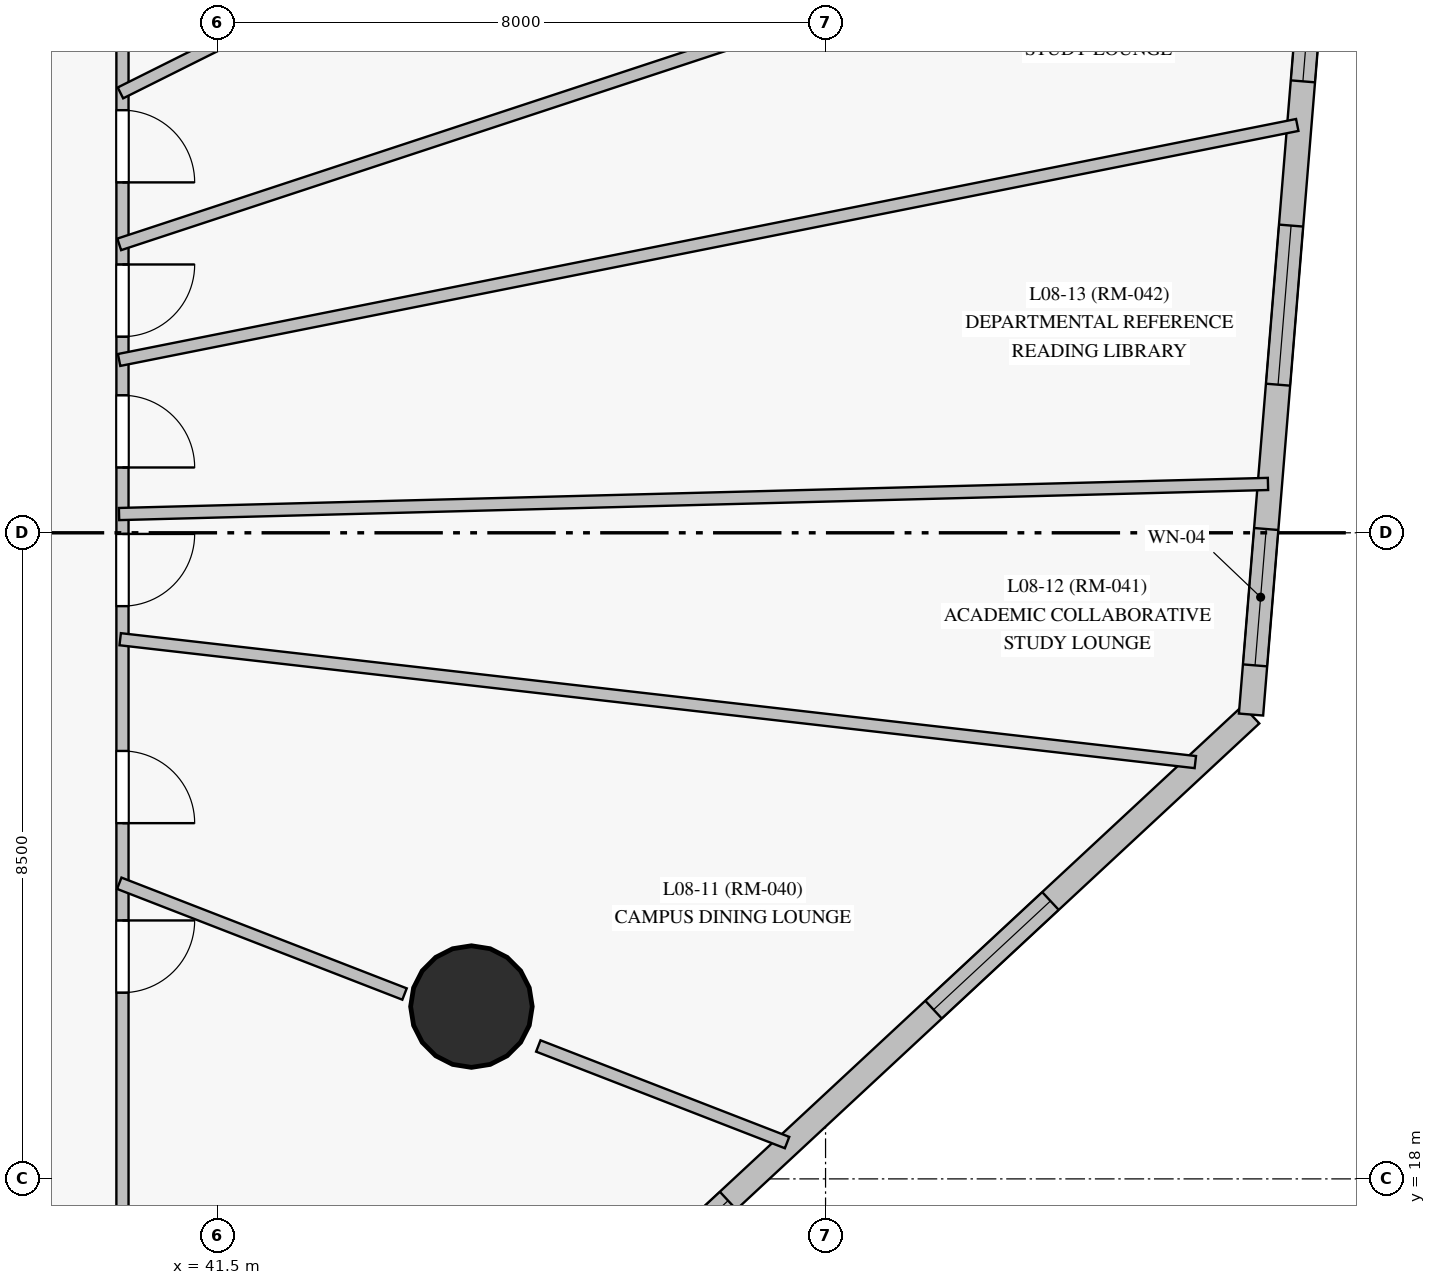
"""IFC4 building model, lengths in metres.
Left out: names, types, materials, properties, quantities, classifications, styles, units other than length and angle.
Written with IfcOpenShell. Run it as: python <this file> out.ifc"""

import sys

from ifc_helpers import new_model, si_unit, direction, frame, frame_2d, origin, origin_with_axes, origin_2d, place, context, subcontext, project, spatial, rectangle, circle, extrude, source, transform, mapped, element, fill, save


model = new_model("IFC4")
c1 = context("Model", 3, precision=1e-05, world=origin(), true_north=direction((0.0, 1.0)))
c2 = subcontext(c1, "Body", "Model", "MODEL_VIEW")
j1 = project(units=[si_unit("LENGTHUNIT", "METRE"), si_unit("PLANEANGLEUNIT", "RADIAN")], contexts=[c1])
p1 = place(None, origin())
s1 = spatial("IfcSite", under=j1, at=p1, CompositionType="ELEMENT")
p2 = place(p1, origin())
s2 = spatial("IfcBuilding", under=s1, at=p2, CompositionType="ELEMENT")
p3 = place(p2, frame((0.0, 0.0, 33.7)))
s3 = spatial("IfcBuildingStorey", under=s2, at=p3, CompositionType="ELEMENT", Elevation=33.7)
m1 = source(origin_with_axes(), c2, "Body", "SweptSolid", [
    extrude(circle(Radius=0.8, at=origin_2d()), origin(), (0.0, 0.0, 1.0), 3.6),
])
p4 = place(p3, frame((44.841, 20.267, 0.0), z_axis=(0.0, 0.0, 1.0), x_axis=(1.0, 0.0, 0.0)))
e1 = element("IfcColumn", 1, at=p4, inside=s3, PredefinedType="COLUMN", context=c2, shape_type="MappedRepresentation", body=[
    mapped(m1, transform((0.0, 0.0, 0.0), scale=1.0)),
])
p5 = place(p3, frame((43.208, 13.057, 0.0), z_axis=(0.0, 0.0, 1.0), x_axis=(0.732423224096, 0.680849631567, 0.0)))
e2 = element("IfcWall", 2, at=p5, inside=s3, PredefinedType="SOLIDWALL", context=c2, shape_type="SweptSolid", body=[
    extrude(rectangle(XDim=16.232, YDim=0.32, at=frame_2d((8.116, 0.0))), origin(), (0.0, 0.0, 1.0), 3.35),
])
p6 = place(p5, frame((1.133, 0.0, 0.85)))
e3 = element("IfcOpeningElement", 3, at=p6, cuts=e2, PredefinedType="OPENING", context=c2, shape_type="SweptSolid", body=[
    extrude(rectangle(XDim=2.1, YDim=1.95, at=frame_2d((1.05, 0.975))), frame((0.0, 0.17, 0.0), z_axis=(0.0, -1.0, 0.0), x_axis=(1.0, 0.0, 0.0)), (0.0, 0.0, 1.0), 0.34),
])
p7 = place(p5, frame((4.74, 0.0, 0.85)))
e4 = element("IfcOpeningElement", 4, at=p7, cuts=e2, PredefinedType="OPENING", context=c2, shape_type="SweptSolid", body=[
    extrude(rectangle(XDim=2.1, YDim=1.95, at=frame_2d((1.05, 0.975))), frame((0.0, 0.17, 0.0), z_axis=(0.0, -1.0, 0.0), x_axis=(1.0, 0.0, 0.0)), (0.0, 0.0, 1.0), 0.34),
])
p8 = place(p5, frame((10.53, 0.0, 0.85)))
e5 = element("IfcOpeningElement", 5, at=p8, cuts=e2, PredefinedType="OPENING", context=c2, shape_type="SweptSolid", body=[
    extrude(rectangle(XDim=2.1, YDim=1.95, at=frame_2d((1.05, 0.975))), frame((0.0, 0.17, 0.0), z_axis=(0.0, -1.0, 0.0), x_axis=(1.0, 0.0, 0.0)), (0.0, 0.0, 1.0), 0.34),
])
p9 = place(p3, frame((55.097, 24.109, 0.0), z_axis=(0.0, 0.0, 1.0), x_axis=(0.081674843911, 0.996659028892, 0.0)))
e6 = element("IfcWall", 6, at=p9, inside=s3, PredefinedType="SOLIDWALL", context=c2, shape_type="SweptSolid", body=[
    extrude(rectangle(XDim=10.806, YDim=0.32, at=frame_2d((5.403, 0.0))), origin(), (0.0, 0.0, 1.0), 3.35),
])
p10 = place(p9, frame((0.649, 0.0, 0.85)))
e7 = element("IfcOpeningElement", 7, at=p10, cuts=e6, PredefinedType="OPENING", context=c2, shape_type="SweptSolid", body=[
    extrude(rectangle(XDim=1.8, YDim=1.85, at=frame_2d((0.9, 0.925))), frame((0.0, 0.17, 0.0), z_axis=(0.0, -1.0, 0.0), x_axis=(1.0, 0.0, 0.0)), (0.0, 0.0, 1.0), 0.34),
])
p11 = place(p9, frame((4.354, 0.0, 0.85)))
e8 = element("IfcOpeningElement", 8, at=p11, cuts=e6, PredefinedType="OPENING", context=c2, shape_type="SweptSolid", body=[
    extrude(rectangle(XDim=2.1, YDim=1.95, at=frame_2d((1.05, 0.975))), frame((0.0, 0.17, 0.0), z_axis=(0.0, -1.0, 0.0), x_axis=(1.0, 0.0, 0.0)), (0.0, 0.0, 1.0), 0.34),
])
p12 = place(p9, frame((8.358, 0.0, 0.85)))
e9 = element("IfcOpeningElement", 9, at=p12, cuts=e6, PredefinedType="OPENING", context=c2, shape_type="SweptSolid", body=[
    extrude(rectangle(XDim=1.8, YDim=1.85, at=frame_2d((0.9, 0.925))), frame((0.0, 0.17, 0.0), z_axis=(0.0, -1.0, 0.0), x_axis=(1.0, 0.0, 0.0)), (0.0, 0.0, 1.0), 0.34),
])
p13 = place(p3, frame((40.25, 37.65, 0.0), z_axis=(0.0, 0.0, 1.0), x_axis=(0.0, -1.0, 0.0)))
e10 = element("IfcWall", 10, at=p13, inside=s3, PredefinedType="PARTITIONING", context=c2, shape_type="SweptSolid", body=[
    extrude(rectangle(XDim=22.3, YDim=0.16, at=frame_2d((11.15, 0.0))), origin(), (0.0, 0.0, 1.0), 2.75),
])
p14 = place(p13, frame((16.25, 0.0, 0.0)))
e11 = element("IfcOpeningElement", 11, at=p14, cuts=e10, PredefinedType="OPENING", context=c2, shape_type="SweptSolid", body=[
    extrude(rectangle(XDim=0.95, YDim=2.15, at=frame_2d((0.475, 1.075))), frame((0.0, 0.09, 0.0), z_axis=(0.0, -1.0, 0.0), x_axis=(1.0, 0.0, 0.0)), (0.0, 0.0, 1.0), 0.18),
])
p15 = place(p13, frame((14.02, 0.0, 0.0)))
e12 = element("IfcOpeningElement", 12, at=p15, cuts=e10, PredefinedType="OPENING", context=c2, shape_type="SweptSolid", body=[
    extrude(rectangle(XDim=0.95, YDim=2.15, at=frame_2d((0.475, 1.075))), frame((0.0, 0.09, 0.0), z_axis=(0.0, -1.0, 0.0), x_axis=(1.0, 0.0, 0.0)), (0.0, 0.0, 1.0), 0.18),
])
p16 = place(p13, frame((11.165, 0.0, 0.0)))
e13 = element("IfcOpeningElement", 13, at=p16, cuts=e10, PredefinedType="OPENING", context=c2, shape_type="SweptSolid", body=[
    extrude(rectangle(XDim=0.95, YDim=2.15, at=frame_2d((0.475, 1.075))), frame((0.0, 0.09, 0.0), z_axis=(0.0, -1.0, 0.0), x_axis=(1.0, 0.0, 0.0)), (0.0, 0.0, 1.0), 0.18),
])
p17 = place(p13, frame((9.341, 0.0, 0.0)))
e14 = element("IfcOpeningElement", 14, at=p17, cuts=e10, PredefinedType="OPENING", context=c2, shape_type="SweptSolid", body=[
    extrude(rectangle(XDim=0.95, YDim=2.15, at=frame_2d((0.475, 1.075))), frame((0.0, 0.09, 0.0), z_axis=(0.0, -1.0, 0.0), x_axis=(1.0, 0.0, 0.0)), (0.0, 0.0, 1.0), 0.18),
])
p18 = place(p13, frame((7.62, 0.0, 0.0)))
e15 = element("IfcOpeningElement", 15, at=p18, cuts=e10, PredefinedType="OPENING", context=c2, shape_type="SweptSolid", body=[
    extrude(rectangle(XDim=0.95, YDim=2.15, at=frame_2d((0.475, 1.075))), frame((0.0, 0.09, 0.0), z_axis=(0.0, -1.0, 0.0), x_axis=(1.0, 0.0, 0.0)), (0.0, 0.0, 1.0), 0.18),
])
p19 = place(p13, frame((5.59, 0.0, 0.0)))
e16 = element("IfcOpeningElement", 16, at=p19, cuts=e10, PredefinedType="OPENING", context=c2, shape_type="SweptSolid", body=[
    extrude(rectangle(XDim=0.95, YDim=2.15, at=frame_2d((0.475, 1.075))), frame((0.0, 0.09, 0.0), z_axis=(0.0, -1.0, 0.0), x_axis=(1.0, 0.0, 0.0)), (0.0, 0.0, 1.0), 0.18),
])
p20 = place(p13, frame((3.591, 0.0, 0.0)))
e17 = element("IfcOpeningElement", 17, at=p20, cuts=e10, PredefinedType="OPENING", context=c2, shape_type="SweptSolid", body=[
    extrude(rectangle(XDim=0.95, YDim=2.15, at=frame_2d((0.475, 1.075))), frame((0.0, 0.09, 0.0), z_axis=(0.0, -1.0, 0.0), x_axis=(1.0, 0.0, 0.0)), (0.0, 0.0, 1.0), 0.18),
])
p21 = place(p13, frame((0.895, 0.0, 0.0)))
e18 = element("IfcOpeningElement", 18, at=p21, cuts=e10, PredefinedType="OPENING", context=c2, shape_type="SweptSolid", body=[
    extrude(rectangle(XDim=0.95, YDim=2.15, at=frame_2d((0.475, 1.075))), frame((0.0, 0.09, 0.0), z_axis=(0.0, -1.0, 0.0), x_axis=(1.0, 0.0, 0.0)), (0.0, 0.0, 1.0), 0.18),
])
p22 = place(p3, frame((40.207, 30.294, 0.0), z_axis=(0.0, 0.0, 1.0), x_axis=(0.949765450766, 0.312962599252, 0.0)))
e19 = element("IfcWall", 19, at=p22, inside=s3, PredefinedType="PARTITIONING", context=c2, shape_type="SweptSolid", body=[
    extrude(rectangle(XDim=16.182, YDim=0.16, at=frame_2d((8.091, 0.0))), origin(), (0.0, 0.0, 1.0), 3.35),
])
p23 = place(p3, frame((40.206, 28.774, 0.0), z_axis=(0.0, 0.0, 1.0), x_axis=(0.980679767077, 0.195620025679, 0.0)))
e20 = element("IfcWall", 20, at=p23, inside=s3, PredefinedType="PARTITIONING", context=c2, shape_type="SweptSolid", body=[
    extrude(rectangle(XDim=15.805, YDim=0.16, at=frame_2d((7.903, 0.0))), origin(), (0.0, 0.0, 1.0), 3.35),
])
p24 = place(p3, frame((40.205, 26.747, 0.0), z_axis=(0.0, 0.0, 1.0), x_axis=(0.999657007579, 0.026189066372, 0.0)))
e21 = element("IfcWall", 21, at=p24, inside=s3, PredefinedType="PARTITIONING", context=c2, shape_type="SweptSolid", body=[
    extrude(rectangle(XDim=15.121, YDim=0.16, at=frame_2d((7.56, 0.0))), origin(), (0.0, 0.0, 1.0), 3.35),
])
p25 = place(p3, frame((40.223, 32.287, 0.0), z_axis=(0.0, 0.0, 1.0), x_axis=(0.894645323944, 0.44677706336, 0.0)))
e22 = element("IfcWall", 22, at=p25, inside=s3, PredefinedType="PARTITIONING", context=c2, shape_type="SweptSolid", body=[
    extrude(rectangle(XDim=14.319, YDim=0.16, at=frame_2d((7.16, 0.0))), origin(), (0.0, 0.0, 1.0), 3.35),
])
p26 = place(p3, frame((40.22, 25.1, 0.0), z_axis=(0.0, 0.0, 1.0), x_axis=(0.993531235452, -0.113559165996, 0.0)))
e23 = element("IfcWall", 23, at=p26, inside=s3, PredefinedType="PARTITIONING", context=c2, shape_type="SweptSolid", body=[
    extrude(rectangle(XDim=14.237, YDim=0.16, at=frame_2d((7.118, 0.0))), origin(), (0.0, 0.0, 1.0), 3.35),
])
p27 = place(p3, frame((40.208, 21.889, 0.0), z_axis=(0.0, 0.0, 1.0), x_axis=(0.932188915671, -0.361972133596, 0.0)))
e24 = element("IfcWall", 24, at=p27, inside=s3, PredefinedType="PARTITIONING", context=c2, shape_type="SweptSolid", body=[
    extrude(rectangle(XDim=4.026, YDim=0.16, at=frame_2d((2.013, 0.0))), origin(), (0.0, 0.0, 1.0), 2.7),
])
p28 = place(p3, frame((45.721, 19.749, 0.0), z_axis=(0.0, 0.0, 1.0), x_axis=(0.932193777392, -0.36195961293, 0.0)))
e25 = element("IfcWall", 25, at=p28, inside=s3, PredefinedType="PARTITIONING", context=c2, shape_type="SweptSolid", body=[
    extrude(rectangle(XDim=3.511, YDim=0.16, at=frame_2d((1.755, 0.0))), origin(), (0.0, 0.0, 1.0), 3.35),
])
m2 = source(origin_with_axes(), c2, "Body", "SweptSolid", [
    extrude(rectangle(XDim=2.1, YDim=1.95, at=frame_2d((1.05, 0.975))), frame((0.0, 0.03, 0.0), z_axis=(0.0, -1.0, 0.0), x_axis=(1.0, 0.0, 0.0)), (0.0, 0.0, 1.0), 0.06),
])
p29 = place(p7, origin())
e26 = element("IfcWindow", 26, at=p29, inside=s3, PartitioningType="SINGLE_PANEL", PredefinedType="WINDOW", context=c2, shape_type="MappedRepresentation", body=[
    mapped(m2, transform((0.0, 0.0, 0.0), scale=1.0)),
])
fill(e4, e26)
p30 = place(p8, origin())
e27 = element("IfcWindow", 27, at=p30, inside=s3, PartitioningType="SINGLE_PANEL", PredefinedType="WINDOW", context=c2, shape_type="MappedRepresentation", body=[
    mapped(m2, transform((0.0, 0.0, 0.0), scale=1.0)),
])
fill(e5, e27)
m3 = source(origin_with_axes(), c2, "Body", "SweptSolid", [
    extrude(rectangle(XDim=1.8, YDim=1.85, at=frame_2d((0.9, 0.925))), frame((0.0, 0.03, 0.0), z_axis=(0.0, -1.0, 0.0), x_axis=(1.0, 0.0, 0.0)), (0.0, 0.0, 1.0), 0.06),
])
p31 = place(p10, origin())
e28 = element("IfcWindow", 28, at=p31, inside=s3, PartitioningType="SINGLE_PANEL", PredefinedType="WINDOW", context=c2, shape_type="MappedRepresentation", body=[
    mapped(m3, transform((0.0, 0.0, 0.0), scale=1.0)),
])
fill(e7, e28)
p32 = place(p11, origin())
e29 = element("IfcWindow", 29, at=p32, inside=s3, PartitioningType="SINGLE_PANEL", PredefinedType="WINDOW", context=c2, shape_type="MappedRepresentation", body=[
    mapped(m2, transform((0.0, 0.0, 0.0), scale=1.0)),
])
fill(e8, e29)
p33 = place(p12, origin())
e30 = element("IfcWindow", 30, at=p33, inside=s3, PartitioningType="SINGLE_PANEL", PredefinedType="WINDOW", context=c2, shape_type="MappedRepresentation", body=[
    mapped(m3, transform((0.0, 0.0, 0.0), scale=1.0)),
])
fill(e9, e30)
m4 = source(origin_with_axes(), c2, "Body", "SweptSolid", [
    extrude(rectangle(XDim=0.95, YDim=2.15, at=frame_2d((0.475, 1.075))), frame((0.0, 0.025, 0.0), z_axis=(0.0, -1.0, 0.0), x_axis=(1.0, 0.0, 0.0)), (0.0, 0.0, 1.0), 0.05),
])
p34 = place(p14, origin())
e31 = element("IfcDoor", 31, at=p34, inside=s3, OperationType="SINGLE_SWING_LEFT", PredefinedType="DOOR", context=c2, shape_type="MappedRepresentation", body=[
    mapped(m4, transform((0.0, 0.0, 0.0), scale=1.0)),
])
fill(e11, e31)
p35 = place(p15, origin())
e32 = element("IfcDoor", 32, at=p35, inside=s3, OperationType="SINGLE_SWING_RIGHT", PredefinedType="DOOR", context=c2, shape_type="MappedRepresentation", body=[
    mapped(m4, transform((0.0, 0.0, 0.0), scale=1.0)),
])
fill(e12, e32)
p36 = place(p16, origin())
e33 = element("IfcDoor", 33, at=p36, inside=s3, OperationType="SINGLE_SWING_LEFT", PredefinedType="DOOR", context=c2, shape_type="MappedRepresentation", body=[
    mapped(m4, transform((0.0, 0.0, 0.0), scale=1.0)),
])
fill(e13, e33)
p37 = place(p17, origin())
e34 = element("IfcDoor", 34, at=p37, inside=s3, OperationType="SINGLE_SWING_RIGHT", PredefinedType="DOOR", context=c2, shape_type="MappedRepresentation", body=[
    mapped(m4, transform((0.0, 0.0, 0.0), scale=1.0)),
])
fill(e14, e34)
p38 = place(p18, origin())
e35 = element("IfcDoor", 35, at=p38, inside=s3, OperationType="SINGLE_SWING_LEFT", PredefinedType="DOOR", context=c2, shape_type="MappedRepresentation", body=[
    mapped(m4, transform((0.0, 0.0, 0.0), scale=1.0)),
])
fill(e15, e35)
p39 = place(p19, origin())
e36 = element("IfcDoor", 36, at=p39, inside=s3, OperationType="SINGLE_SWING_RIGHT", PredefinedType="DOOR", context=c2, shape_type="MappedRepresentation", body=[
    mapped(m4, transform((0.0, 0.0, 0.0), scale=1.0)),
])
fill(e16, e36)
save(model, sys.argv[1])
